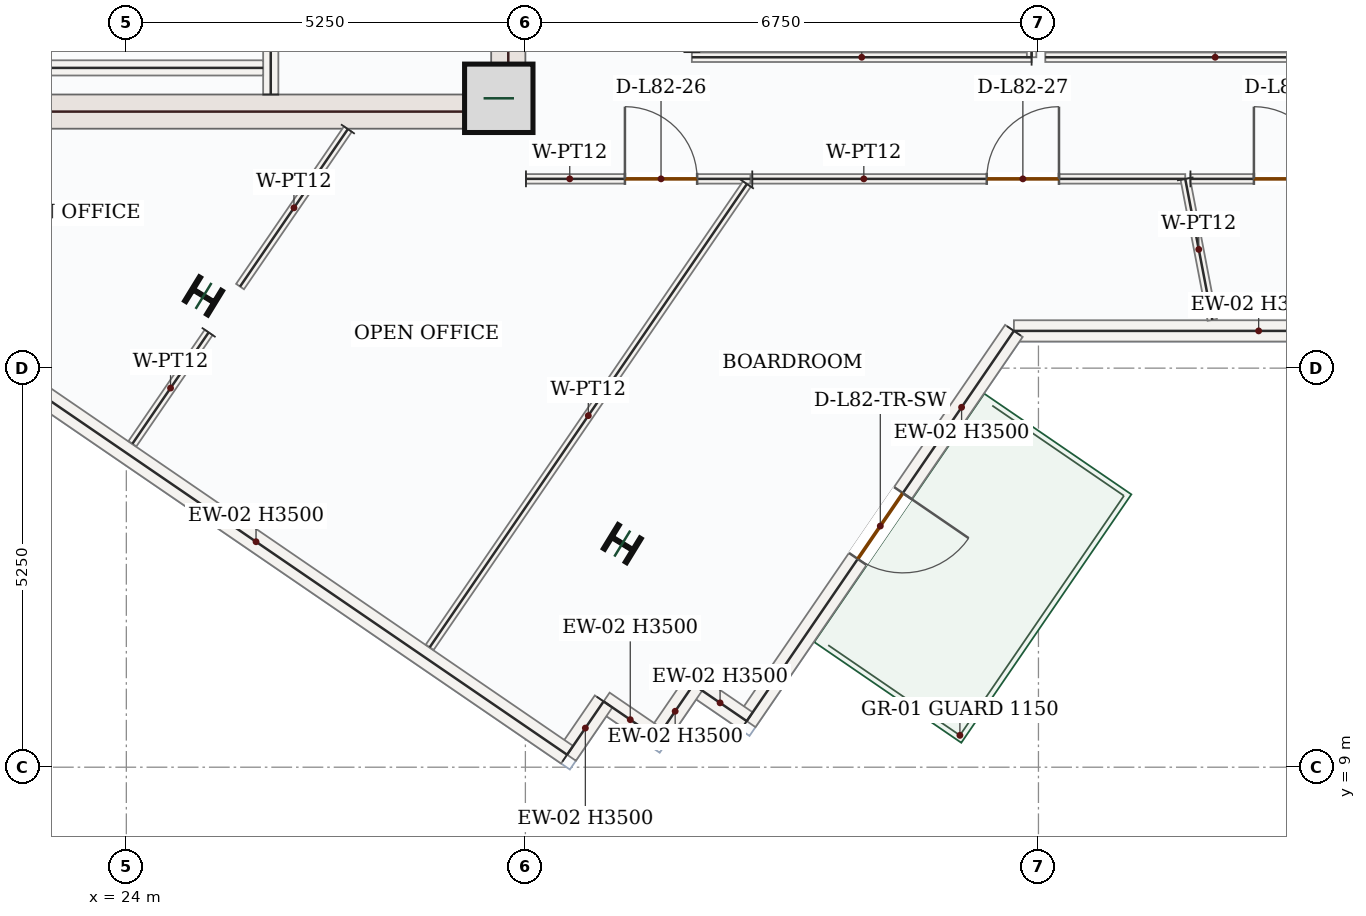
"""IFC4 building model, lengths in metres.
Left out: names, types, materials, properties, quantities, classifications, styles, units other than length and angle.
Written with IfcOpenShell. Run it as: python <this file> out.ifc"""

import sys

from ifc_helpers import new_model, si_unit, direction, frame, frame_2d, origin, origin_2d, place, context, subcontext, project, spatial, rectangle, i_section, extrude, source, transform, mapped, element, fill, save


model = new_model("IFC4")
c1 = context("Model", 3, precision=1e-05, world=origin(), true_north=direction((0.0, 1.0)))
c2 = subcontext(c1, "Body", "Model", "MODEL_VIEW")
j1 = project(units=[si_unit("LENGTHUNIT", "METRE"), si_unit("PLANEANGLEUNIT", "RADIAN")], contexts=[c1])
p1 = place(None, origin())
s1 = spatial("IfcSite", under=j1, at=p1, CompositionType="ELEMENT")
p2 = place(p1, origin())
s2 = spatial("IfcBuilding", under=s1, at=p2, CompositionType="ELEMENT")
p3 = place(p2, frame((0.0, 0.0, 338.55)))
s3 = spatial("IfcBuildingStorey", under=s2, at=p3, CompositionType="ELEMENT", Elevation=338.55)
p4 = place(p3, frame((29.025, 17.4, 0.0), z_axis=(0.0, 0.0, 1.0), x_axis=(0.0, 1.0, 0.0)))
e1 = element("IfcWall", 1, at=p4, inside=s3, PredefinedType="SHEAR", context=c2, shape_type="SweptSolid", body=[
    extrude(rectangle(XDim=8.55, YDim=0.45, at=frame_2d((4.275, 0.0))), origin(), (0.0, 0.0, 1.0), 3.5),
])
p5 = place(p4, frame((6.65, 0.0, 0.0)))
e2 = element("IfcOpeningElement", 2, at=p5, cuts=e1, PredefinedType="OPENING", context=c2, shape_type="SweptSolid", body=[
    extrude(rectangle(XDim=1.1, YDim=2.2, at=frame_2d((0.55, 1.1))), frame((0.0, 0.235, 0.0), z_axis=(0.0, -1.0, 0.0), x_axis=(1.0, 0.0, 0.0)), (0.0, 0.0, 1.0), 0.47),
])
p6 = place(p4, frame((2.15, 0.0, 0.0)))
e3 = element("IfcOpeningElement", 3, at=p6, cuts=e1, PredefinedType="OPENING", context=c2, shape_type="SweptSolid", body=[
    extrude(rectangle(XDim=0.88, YDim=2.1, at=frame_2d((0.44, 1.05))), frame((0.0, 0.235, 0.0), z_axis=(0.0, -1.0, 0.0), x_axis=(1.0, 0.0, 0.0)), (0.0, 0.0, 1.0), 0.47),
])
p7 = place(p4, frame((4.25, 0.0, 0.0)))
e4 = element("IfcOpeningElement", 4, at=p7, cuts=e1, PredefinedType="OPENING", context=c2, shape_type="SweptSolid", body=[
    extrude(rectangle(XDim=0.88, YDim=2.1, at=frame_2d((0.44, 1.05))), frame((0.0, 0.235, 0.0), z_axis=(0.0, -1.0, 0.0), x_axis=(1.0, 0.0, 0.0)), (0.0, 0.0, 1.0), 0.47),
])
m1 = source(origin(), c2, "Body", "SweptSolid", [
    extrude(rectangle(XDim=7.1, YDim=0.45, at=frame_2d((3.55, 0.0))), origin(), (0.0, 0.0, 1.0), 3.5),
])
p8 = place(p3, frame((21.7, 17.625, 0.0), z_axis=(0.0, 0.0, 1.0), x_axis=(1.0, 0.0, 0.0)))
e5 = element("IfcWall", 5, at=p8, inside=s3, PredefinedType="SHEAR", context=c2, shape_type="MappedRepresentation", body=[
    mapped(m1, transform((0.0, 0.0, 0.0), x_axis=(1.0, 0.0, 0.0), y_axis=(0.0, 1.0, 0.0), z_axis=(0.0, 0.0, 1.0), scale=1.0)),
])
m2 = source(origin(), c2, "Body", "SweptSolid", [
    extrude(rectangle(XDim=0.9, YDim=0.9, at=origin_2d()), origin(), (0.0, 0.0, 1.0), 3.75),
])
p9 = place(p3, frame((28.9, 17.8, 0.0), z_axis=(0.0, 0.0, 1.0), x_axis=(1.0, 0.0, 0.0)))
e6 = element("IfcColumn", 6, at=p9, inside=s3, PredefinedType="COLUMN", context=c2, shape_type="MappedRepresentation", body=[
    mapped(m2, transform((0.0, 0.0, 0.0), x_axis=(1.0, 0.0, 0.0), y_axis=(0.0, 1.0, 0.0), z_axis=(0.0, 0.0, 1.0), scale=1.0)),
])
m3 = source(origin(), c2, "Body", "SweptSolid", [
    extrude(i_section(OverallWidth=0.369, OverallDepth=0.356, WebThickness=0.011, FlangeThickness=0.018, FilletRadius=0.018, at=origin_2d()), origin(), (0.0, 0.0, 1.0), 3.75),
])
for number, where, z_axis, x_axis in (
    (7, (25.016, 15.2, 0.0), (0.0, 0.0, 1.0), (0.522, 0.853, 0.0)),
    (8, (30.525, 11.942, 0.0), (0.0, 0.0, 1.0), (0.522, 0.853, 0.0)),
):
    element("IfcColumn", number, at=place(p3, frame(where, z_axis=z_axis, x_axis=x_axis)), inside=s3, PredefinedType="COLUMN", context=c2, shape_type="MappedRepresentation", body=[
        mapped(m3, transform((0.0, 0.0, 0.0), x_axis=(1.0, 0.0, 0.0), y_axis=(0.0, 1.0, 0.0), z_axis=(0.0, 0.0, 1.0), scale=1.0)),
    ])
m4 = source(origin(), c2, "Body", "SweptSolid", [
    extrude(rectangle(XDim=6.44, YDim=0.28, at=frame_2d((3.22, 0.0))), origin(), (0.0, 0.0, 1.0), 3.5),
])
p10 = place(p3, frame((42.117, 14.74, 0.0), z_axis=(0.0, 0.0, 1.0), x_axis=(-1.0, 0.0, 0.0)))
e9 = element("IfcWall", 9, at=p10, inside=s3, PredefinedType="SOLIDWALL", context=c2, shape_type="MappedRepresentation", body=[
    mapped(m4, transform((0.0, 0.0, 0.0), x_axis=(1.0, 0.0, 0.0), y_axis=(0.0, 1.0, 0.0), z_axis=(0.0, 0.0, 1.0), scale=1.0)),
])
p11 = place(p3, frame((35.677, 14.74, 0.0), z_axis=(0.0, 0.0, 1.0), x_axis=(-0.564953982519, -0.825122413728, 0.0)))
e10 = element("IfcWall", 10, at=p11, inside=s3, PredefinedType="SOLIDWALL", context=c2, shape_type="SweptSolid", body=[
    extrude(rectangle(XDim=6.221, YDim=0.28, at=frame_2d((3.111, 0.0))), origin(), (0.0, 0.0, 1.0), 3.5),
])
p12 = place(p11, frame((2.586, 0.0, 0.0)))
e11 = element("IfcOpeningElement", 11, at=p12, cuts=e10, PredefinedType="OPENING", context=c2, shape_type="SweptSolid", body=[
    extrude(rectangle(XDim=1.05, YDim=2.15, at=frame_2d((0.525, 1.075))), frame((0.0, 0.15, 0.0), z_axis=(0.0, -1.0, 0.0), x_axis=(1.0, 0.0, 0.0)), (0.0, 0.0, 1.0), 0.3),
])
m5 = source(origin(), c2, "Body", "SweptSolid", [
    extrude(rectangle(XDim=0.85, YDim=0.28, at=frame_2d((0.425, 0.0))), origin(), (0.0, 0.0, 1.0), 3.5),
])
for number, where, z_axis, x_axis in (
    (12, (32.162, 9.606, 0.0), (0.0, 0.0, 1.0), (-0.825, 0.565, 0.0)),
    (13, (31.461, 10.087, 0.0), (0.0, 0.0, 1.0), (-0.565, -0.825, 0.0)),
    (14, (30.98, 9.385, 0.0), (0.0, 0.0, 1.0), (-0.825, 0.565, 0.0)),
):
    element("IfcWall", number, at=place(p3, frame(where, z_axis=z_axis, x_axis=x_axis)), inside=s3, PredefinedType="SOLIDWALL", context=c2, shape_type="MappedRepresentation", body=[
        mapped(m5, transform((0.0, 0.0, 0.0), x_axis=(1.0, 0.0, 0.0), y_axis=(0.0, 1.0, 0.0), z_axis=(0.0, 0.0, 1.0), scale=1.0)),
    ])
m6 = source(origin(), c2, "Body", "SweptSolid", [
    extrude(rectangle(XDim=0.85, YDim=0.28, at=frame_2d((0.425, 0.0))), origin(), (0.0, 0.0, 1.0), 3.5),
])
p13 = place(p3, frame((30.279, 9.865, 0.0), z_axis=(0.0, 0.0, 1.0), x_axis=(-0.565064897913, -0.825046459993, 0.0)))
e15 = element("IfcWall", 15, at=p13, inside=s3, PredefinedType="SOLIDWALL", context=c2, shape_type="MappedRepresentation", body=[
    mapped(m6, transform((0.0, 0.0, 0.0), x_axis=(1.0, 0.0, 0.0), y_axis=(0.0, 1.0, 0.0), z_axis=(0.0, 0.0, 1.0), scale=1.0)),
])
m7 = source(origin(), c2, "Body", "SweptSolid", [
    extrude(rectangle(XDim=9.92, YDim=0.28, at=frame_2d((4.96, 0.0))), origin(), (0.0, 0.0, 1.0), 3.5),
])
p14 = place(p3, frame((29.799, 9.164, 0.0), z_axis=(0.0, 0.0, 1.0), x_axis=(-0.825121888295, 0.56495474992, 0.0)))
e16 = element("IfcWall", 16, at=p14, inside=s3, PredefinedType="SOLIDWALL", context=c2, shape_type="MappedRepresentation", body=[
    mapped(m7, transform((0.0, 0.0, 0.0), x_axis=(1.0, 0.0, 0.0), y_axis=(0.0, 1.0, 0.0), z_axis=(0.0, 0.0, 1.0), scale=1.0)),
])
p15 = place(p3, frame((25.9, 17.85, 0.0), z_axis=(0.0, 0.0, 1.0), x_axis=(0.0, 1.0, 0.0)))
e17 = element("IfcWall", 17, at=p15, inside=s3, PredefinedType="SOLIDWALL", context=c2, shape_type="SweptSolid", body=[
    extrude(rectangle(XDim=8.0, YDim=0.2, at=frame_2d((4.0, 0.0))), origin(), (0.0, 0.0, 1.0), 3.5),
])
p16 = place(p15, frame((6.2, 0.0, 0.0)))
e18 = element("IfcOpeningElement", 18, at=p16, cuts=e17, PredefinedType="OPENING", context=c2, shape_type="SweptSolid", body=[
    extrude(rectangle(XDim=1.0, YDim=2.15, at=frame_2d((0.5, 1.075))), frame((0.0, 0.11, 0.0), z_axis=(0.0, -1.0, 0.0), x_axis=(1.0, 0.0, 0.0)), (0.0, 0.0, 1.0), 0.22),
])
p17 = place(p15, frame((0.6, 0.0, 0.0)))
e19 = element("IfcOpeningElement", 19, at=p17, cuts=e17, PredefinedType="OPENING", context=c2, shape_type="SweptSolid", body=[
    extrude(rectangle(XDim=0.88, YDim=2.1, at=frame_2d((0.44, 1.05))), frame((0.0, 0.11, 0.0), z_axis=(0.0, -1.0, 0.0), x_axis=(1.0, 0.0, 0.0)), (0.0, 0.0, 1.0), 0.22),
])
m8 = source(origin(), c2, "Body", "SweptSolid", [
    extrude(rectangle(XDim=3.25, YDim=0.2, at=frame_2d((1.625, 0.0))), origin(), (0.0, 0.0, 1.0), 3.5),
])
p18 = place(p3, frame((22.55, 18.2, 0.0), z_axis=(0.0, 0.0, 1.0), x_axis=(1.0, 0.0, 0.0)))
e20 = element("IfcWall", 20, at=p18, inside=s3, PredefinedType="SOLIDWALL", context=c2, shape_type="MappedRepresentation", body=[
    mapped(m8, transform((0.0, 0.0, 0.0), x_axis=(1.0, 0.0, 0.0), y_axis=(0.0, 1.0, 0.0), z_axis=(0.0, 0.0, 1.0), scale=1.0)),
])
m9 = source(origin(), c2, "Body", "SweptSolid", [
    extrude(rectangle(XDim=2.511, YDim=0.125, at=frame_2d((1.255, 0.0))), origin(), (0.0, 0.0, 1.0), 3.5),
])
p19 = place(p3, frame((26.915, 17.395, 0.0), z_axis=(0.0, 0.0, 1.0), x_axis=(-0.564980194272, -0.825104466162, 0.0)))
e21 = element("IfcWall", 21, at=p19, inside=s3, PredefinedType="PARTITIONING", context=c2, shape_type="MappedRepresentation", body=[
    mapped(m9, transform((0.0, 0.0, 0.0), x_axis=(1.0, 0.0, 0.0), y_axis=(0.0, 1.0, 0.0), z_axis=(0.0, 0.0, 1.0), scale=1.0)),
])
m10 = source(origin(), c2, "Body", "SweptSolid", [
    extrude(rectangle(XDim=1.775, YDim=0.125, at=frame_2d((0.888, 0.0))), origin(), (0.0, 0.0, 1.0), 3.5),
])
p20 = place(p3, frame((25.083, 14.72, 0.0), z_axis=(0.0, 0.0, 1.0), x_axis=(-0.56509798207, -0.825023800057, 0.0)))
e22 = element("IfcWall", 22, at=p20, inside=s3, PredefinedType="PARTITIONING", context=c2, shape_type="MappedRepresentation", body=[
    mapped(m10, transform((0.0, 0.0, 0.0), x_axis=(1.0, 0.0, 0.0), y_axis=(0.0, 1.0, 0.0), z_axis=(0.0, 0.0, 1.0), scale=1.0)),
])
p21 = place(p3, frame((29.258, 16.74, 0.0), z_axis=(0.0, 0.0, 1.0), x_axis=(0.999999996583, -8.2671957e-05, 0.0)))
e23 = element("IfcWall", 23, at=p21, inside=s3, PredefinedType="PARTITIONING", context=c2, shape_type="SweptSolid", body=[
    extrude(rectangle(XDim=2.953, YDim=0.125, at=frame_2d((1.477, 0.0))), origin(), (0.0, 0.0, 1.0), 3.5),
])
p22 = place(p21, frame((1.302, 0.0, 0.0)))
e24 = element("IfcOpeningElement", 24, at=p22, cuts=e23, PredefinedType="OPENING", context=c2, shape_type="SweptSolid", body=[
    extrude(rectangle(XDim=0.95, YDim=2.15, at=frame_2d((0.475, 1.075))), frame((0.0, 0.073, 0.0), z_axis=(0.0, -1.0, 0.0), x_axis=(1.0, 0.0, 0.0)), (0.0, 0.0, 1.0), 0.145),
])
m11 = source(origin(), c2, "Body", "SweptSolid", [
    extrude(rectangle(XDim=7.387, YDim=0.125, at=frame_2d((3.693, 0.0))), origin(), (0.0, 0.0, 1.0), 3.5),
])
p23 = place(p3, frame((32.165, 16.673, 0.0), z_axis=(0.0, 0.0, 1.0), x_axis=(-0.564969427755, -0.8251118383, 0.0)))
e25 = element("IfcWall", 25, at=p23, inside=s3, PredefinedType="PARTITIONING", context=c2, shape_type="MappedRepresentation", body=[
    mapped(m11, transform((0.0, 0.0, 0.0), x_axis=(1.0, 0.0, 0.0), y_axis=(0.0, 1.0, 0.0), z_axis=(0.0, 0.0, 1.0), scale=1.0)),
])
m12 = source(origin(), c2, "Body", "SweptSolid", [
    extrude(rectangle(XDim=4.47, YDim=0.125, at=frame_2d((2.235, 0.0))), origin(), (0.0, 0.0, 1.0), 3.5),
])
p24 = place(p3, frame((35.91, 18.34, 0.0), z_axis=(0.0, 0.0, 1.0), x_axis=(-1.0, 0.0, 0.0)))
e26 = element("IfcWall", 26, at=p24, inside=s3, PredefinedType="PARTITIONING", context=c2, shape_type="MappedRepresentation", body=[
    mapped(m12, transform((0.0, 0.0, 0.0), x_axis=(1.0, 0.0, 0.0), y_axis=(0.0, 1.0, 0.0), z_axis=(0.0, 0.0, 1.0), scale=1.0)),
])
m13 = source(origin(), c2, "Body", "SweptSolid", [
    extrude(rectangle(XDim=7.47, YDim=0.125, at=frame_2d((3.735, 0.0))), origin(), (0.0, 0.0, 1.0), 3.5),
])
p25 = place(p3, frame((35.91, 25.81, 0.0), z_axis=(0.0, 0.0, 1.0), x_axis=(0.0, -1.0, 0.0)))
e27 = element("IfcWall", 27, at=p25, inside=s3, PredefinedType="PARTITIONING", context=c2, shape_type="MappedRepresentation", body=[
    mapped(m13, transform((0.0, 0.0, 0.0), x_axis=(1.0, 0.0, 0.0), y_axis=(0.0, 1.0, 0.0), z_axis=(0.0, 0.0, 1.0), scale=1.0)),
])
p26 = place(p3, frame((40.56, 18.34, 0.0), z_axis=(0.0, 0.0, 1.0), x_axis=(-1.0, 0.0, 0.0)))
e28 = element("IfcWall", 28, at=p26, inside=s3, PredefinedType="PARTITIONING", context=c2, shape_type="MappedRepresentation", body=[
    mapped(m12, transform((0.0, 0.0, 0.0), x_axis=(1.0, 0.0, 0.0), y_axis=(0.0, 1.0, 0.0), z_axis=(0.0, 0.0, 1.0), scale=1.0)),
])
p27 = place(p3, frame((32.235, 16.74, 0.0), z_axis=(0.0, 0.0, 1.0), x_axis=(1.0, 0.0, 0.0)))
e29 = element("IfcWall", 29, at=p27, inside=s3, PredefinedType="PARTITIONING", context=c2, shape_type="SweptSolid", body=[
    extrude(rectangle(XDim=5.696, YDim=0.125, at=frame_2d((2.848, 0.0))), origin(), (0.0, 0.0, 1.0), 3.5),
])
p28 = place(p27, frame((3.085, 0.0, 0.0)))
e30 = element("IfcOpeningElement", 30, at=p28, cuts=e29, PredefinedType="OPENING", context=c2, shape_type="SweptSolid", body=[
    extrude(rectangle(XDim=0.95, YDim=2.15, at=frame_2d((0.475, 1.075))), frame((0.0, 0.073, 0.0), z_axis=(0.0, -1.0, 0.0), x_axis=(1.0, 0.0, 0.0)), (0.0, 0.0, 1.0), 0.145),
])
m14 = source(origin(), c2, "Body", "SweptSolid", [
    extrude(rectangle(XDim=1.889, YDim=0.125, at=frame_2d((0.944, 0.0))), origin(), (0.0, 0.0, 1.0), 3.5),
])
p29 = place(p3, frame((37.931, 16.74, 0.0), z_axis=(0.0, 0.0, 1.0), x_axis=(0.188454265316, -0.982081966989, 0.0)))
e31 = element("IfcWall", 31, at=p29, inside=s3, PredefinedType="PARTITIONING", context=c2, shape_type="MappedRepresentation", body=[
    mapped(m14, transform((0.0, 0.0, 0.0), x_axis=(1.0, 0.0, 0.0), y_axis=(0.0, 1.0, 0.0), z_axis=(0.0, 0.0, 1.0), scale=1.0)),
])
p30 = place(p3, frame((38.0, 16.74, 0.0), z_axis=(0.0, 0.0, 1.0), x_axis=(1.0, 0.0, 0.0)))
e32 = element("IfcWall", 32, at=p30, inside=s3, PredefinedType="PARTITIONING", context=c2, shape_type="SweptSolid", body=[
    extrude(rectangle(XDim=4.744, YDim=0.125, at=frame_2d((2.372, 0.0))), origin(), (0.0, 0.0, 1.0), 3.5),
])
p31 = place(p30, frame((0.835, 0.0, 0.0)))
e33 = element("IfcOpeningElement", 33, at=p31, cuts=e32, PredefinedType="OPENING", context=c2, shape_type="SweptSolid", body=[
    extrude(rectangle(XDim=0.95, YDim=2.15, at=frame_2d((0.475, 1.075))), frame((0.0, 0.073, 0.0), z_axis=(0.0, -1.0, 0.0), x_axis=(1.0, 0.0, 0.0)), (0.0, 0.0, 1.0), 0.145),
])
m15 = source(origin(), c2, "Body", "SweptSolid", [
    extrude(rectangle(XDim=1.05, YDim=2.15, at=frame_2d((0.525, 1.075))), frame((0.0, 0.025, 0.0), z_axis=(0.0, -1.0, 0.0), x_axis=(1.0, 0.0, 0.0)), (0.0, 0.0, 1.0), 0.05),
])
p32 = place(p12, origin())
e34 = element("IfcDoor", 34, at=p32, inside=s3, OperationType="SINGLE_SWING_LEFT", PredefinedType="DOOR", context=c2, shape_type="MappedRepresentation", body=[
    mapped(m15, transform((0.0, 0.0, 0.0), x_axis=(1.0, 0.0, 0.0), y_axis=(0.0, 1.0, 0.0), z_axis=(0.0, 0.0, 1.0), scale=1.0)),
])
fill(e11, e34)
m16 = source(origin(), c2, "Body", "SweptSolid", [
    extrude(rectangle(XDim=0.95, YDim=2.15, at=frame_2d((0.475, 1.075))), frame((0.0, 0.025, 0.0), z_axis=(0.0, -1.0, 0.0), x_axis=(1.0, 0.0, 0.0)), (0.0, 0.0, 1.0), 0.05),
])
p33 = place(p22, origin())
e35 = element("IfcDoor", 35, at=p33, inside=s3, OperationType="SINGLE_SWING_LEFT", PredefinedType="DOOR", context=c2, shape_type="MappedRepresentation", body=[
    mapped(m16, transform((0.0, 0.0, 0.0), x_axis=(1.0, 0.0, 0.0), y_axis=(0.0, 1.0, 0.0), z_axis=(0.0, 0.0, 1.0), scale=1.0)),
])
fill(e24, e35)
p34 = place(p28, origin())
e36 = element("IfcDoor", 36, at=p34, inside=s3, OperationType="SINGLE_SWING_RIGHT", PredefinedType="DOOR", context=c2, shape_type="MappedRepresentation", body=[
    mapped(m16, transform((0.0, 0.0, 0.0), x_axis=(1.0, 0.0, 0.0), y_axis=(0.0, 1.0, 0.0), z_axis=(0.0, 0.0, 1.0), scale=1.0)),
])
fill(e30, e36)
p35 = place(p31, origin())
e37 = element("IfcDoor", 37, at=p35, inside=s3, OperationType="SINGLE_SWING_LEFT", PredefinedType="DOOR", context=c2, shape_type="MappedRepresentation", body=[
    mapped(m16, transform((0.0, 0.0, 0.0), x_axis=(1.0, 0.0, 0.0), y_axis=(0.0, 1.0, 0.0), z_axis=(0.0, 0.0, 1.0), scale=1.0)),
])
fill(e33, e37)
save(model, sys.argv[1])
